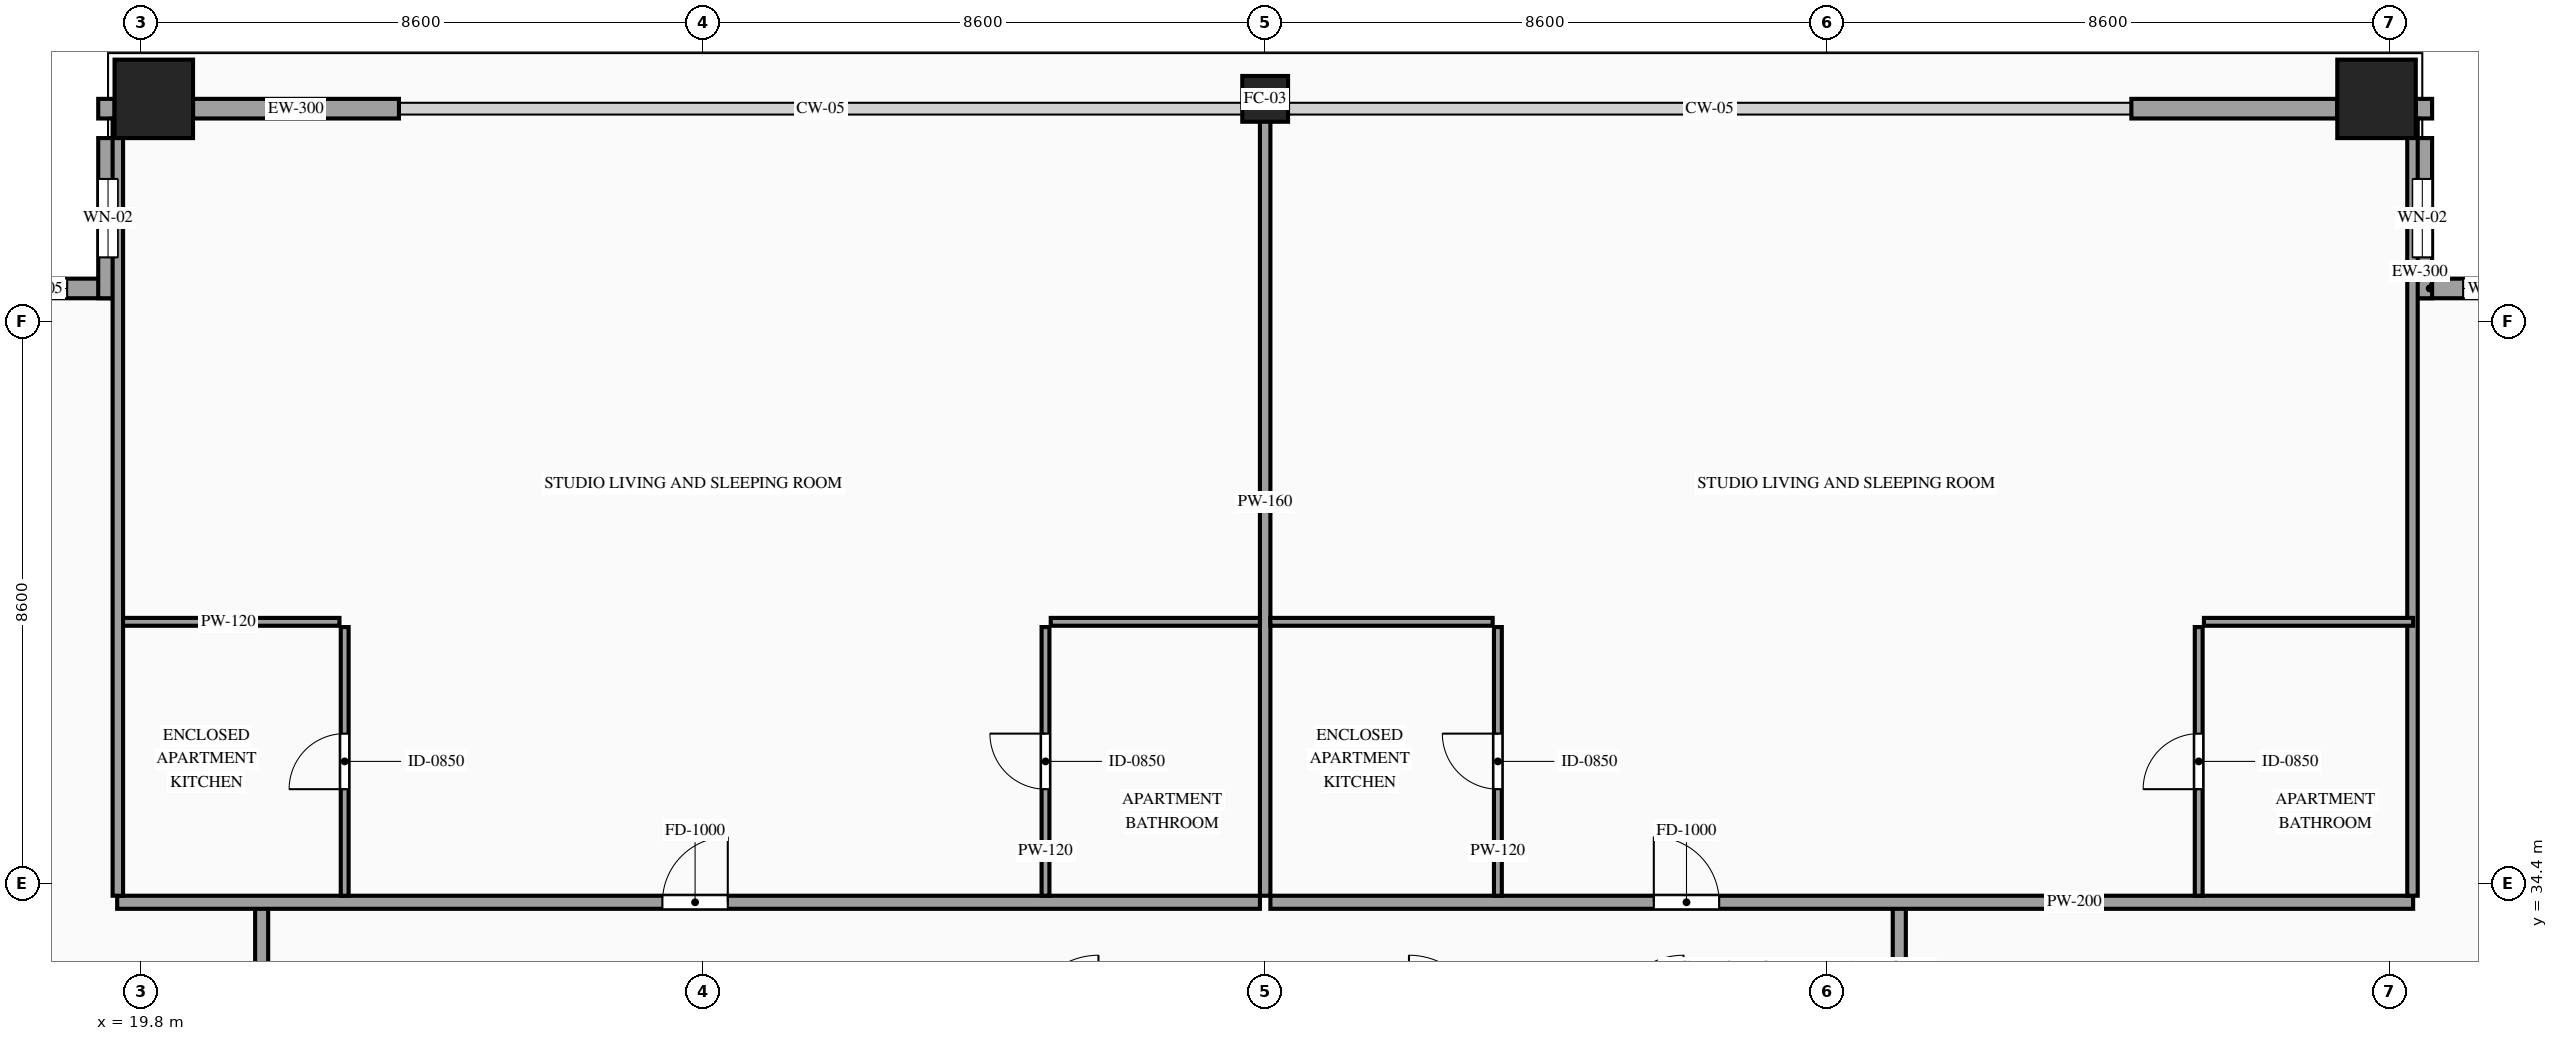
"""IFC4 building model, lengths in metres.
Left out: names, types, materials, properties, quantities, classifications, styles, units other than length and angle.
Written with IfcOpenShell. Run it as: python <this file> out.ifc"""

import sys

from ifc_helpers import new_model, si_unit, direction, frame, frame_2d, origin, origin_2d, place, context, subcontext, project, spatial, rectangle, hollow_rectangle, extrude, source, transform, mapped, element, fill, save


model = new_model("IFC4")
c1 = context("Model", 3, precision=1e-05, world=origin(), true_north=direction((0.0, 1.0)))
c2 = subcontext(c1, "Body", "Model", "MODEL_VIEW")
j1 = project(units=[si_unit("LENGTHUNIT", "METRE"), si_unit("PLANEANGLEUNIT", "RADIAN")], contexts=[c1])
p1 = place(None, origin())
s1 = spatial("IfcSite", under=j1, at=p1, CompositionType="ELEMENT")
p2 = place(p1, origin())
s2 = spatial("IfcBuilding", under=s1, at=p2, CompositionType="ELEMENT")
p3 = place(p2, frame((0.0, 0.0, 268.1)))
s3 = spatial("IfcBuildingStorey", under=s2, at=p3, CompositionType="ELEMENT", Elevation=268.1)
m1 = source(origin(), c2, "Body", "SweptSolid", [
    extrude(hollow_rectangle(XDim=1.2, YDim=1.2, WallThickness=0.055, at=origin_2d()), origin(), (0.0, 0.0, 1.0), 3.5),
])
p4 = place(p3, frame((20.0, 46.4, 0.0), z_axis=(0.0, 0.0, 1.0), x_axis=(1.0, 0.0, 0.0)))
e1 = element("IfcColumn", 1, at=p4, inside=s3, PredefinedType="COLUMN", context=c2, shape_type="MappedRepresentation", body=[
    mapped(m1, transform((0.0, 0.0, 0.0), scale=1.0)),
])
m2 = source(origin(), c2, "Body", "SweptSolid", [
    extrude(hollow_rectangle(XDim=0.7, YDim=0.7, WallThickness=0.032, at=origin_2d()), origin(), (0.0, 0.0, 1.0), 3.5),
])
p5 = place(p3, frame((37.0, 46.4, 0.0), z_axis=(0.0, 0.0, 1.0), x_axis=(1.0, 0.0, 0.0)))
e2 = element("IfcColumn", 2, at=p5, inside=s3, PredefinedType="COLUMN", context=c2, shape_type="MappedRepresentation", body=[
    mapped(m2, transform((0.0, 0.0, 0.0), scale=1.0)),
])
p6 = place(p3, frame((54.0, 46.4, 0.0), z_axis=(0.0, 0.0, 1.0), x_axis=(1.0, 0.0, 0.0)))
e3 = element("IfcColumn", 3, at=p6, inside=s3, PredefinedType="COLUMN", context=c2, shape_type="MappedRepresentation", body=[
    mapped(m1, transform((0.0, 0.0, 0.0), scale=1.0)),
])
p7 = place(p3, frame((19.45, 43.5, 0.0), z_axis=(0.0, 0.0, 1.0), x_axis=(-1.0, 0.0, 0.0)))
e4 = element("IfcWall", 4, at=p7, inside=s3, PredefinedType="SOLIDWALL", context=c2, shape_type="SweptSolid", body=[
    extrude(rectangle(XDim=2.45, YDim=0.3, at=frame_2d((1.225, 0.0))), origin(), (0.0, 0.0, 1.0), 3.28),
])
p8 = place(p7, frame((0.775, 0.0, 0.85)))
e5 = element("IfcOpeningElement", 5, at=p8, cuts=e4, PredefinedType="OPENING", context=c2, shape_type="SweptSolid", body=[
    extrude(rectangle(XDim=0.9, YDim=1.5, at=frame_2d((0.45, 0.75))), frame((0.0, 0.165, 0.0), z_axis=(0.0, -1.0, 0.0), x_axis=(1.0, 0.0, 0.0)), (0.0, 0.0, 1.0), 0.33),
])
p9 = place(p3, frame((19.3, 45.8, 0.0), z_axis=(0.0, 0.0, 1.0), x_axis=(0.0, -1.0, 0.0)))
e6 = element("IfcWall", 6, at=p9, inside=s3, PredefinedType="SOLIDWALL", context=c2, shape_type="SweptSolid", body=[
    extrude(rectangle(XDim=2.45, YDim=0.3, at=frame_2d((1.225, 0.0))), origin(), (0.0, 0.0, 1.0), 3.28),
])
p10 = place(p9, frame((0.625, 0.0, 0.85)))
e7 = element("IfcOpeningElement", 7, at=p10, cuts=e6, PredefinedType="OPENING", context=c2, shape_type="SweptSolid", body=[
    extrude(rectangle(XDim=1.2, YDim=2.1, at=frame_2d((0.6, 1.05))), frame((0.0, 0.165, 0.0), z_axis=(0.0, -1.0, 0.0), x_axis=(1.0, 0.0, 0.0)), (0.0, 0.0, 1.0), 0.33),
])
p11 = place(p3, frame((57.0, 43.5, 0.0), z_axis=(0.0, 0.0, 1.0), x_axis=(-1.0, 0.0, 0.0)))
e8 = element("IfcWall", 8, at=p11, inside=s3, PredefinedType="SOLIDWALL", context=c2, shape_type="SweptSolid", body=[
    extrude(rectangle(XDim=2.45, YDim=0.3, at=frame_2d((1.225, 0.0))), origin(), (0.0, 0.0, 1.0), 3.28),
])
p12 = place(p11, frame((0.775, 0.0, 0.85)))
e9 = element("IfcOpeningElement", 9, at=p12, cuts=e8, PredefinedType="OPENING", context=c2, shape_type="SweptSolid", body=[
    extrude(rectangle(XDim=0.9, YDim=1.5, at=frame_2d((0.45, 0.75))), frame((0.0, 0.165, 0.0), z_axis=(0.0, -1.0, 0.0), x_axis=(1.0, 0.0, 0.0)), (0.0, 0.0, 1.0), 0.33),
])
p13 = place(p3, frame((54.7, 43.35, 0.0), z_axis=(0.0, 0.0, 1.0), x_axis=(0.0, 1.0, 0.0)))
e10 = element("IfcWall", 10, at=p13, inside=s3, PredefinedType="SOLIDWALL", context=c2, shape_type="SweptSolid", body=[
    extrude(rectangle(XDim=2.45, YDim=0.3, at=frame_2d((1.225, 0.0))), origin(), (0.0, 0.0, 1.0), 3.28),
])
p14 = place(p13, frame((0.625, 0.0, 0.85)))
e11 = element("IfcOpeningElement", 11, at=p14, cuts=e10, PredefinedType="OPENING", context=c2, shape_type="SweptSolid", body=[
    extrude(rectangle(XDim=1.2, YDim=2.1, at=frame_2d((0.6, 1.05))), frame((0.0, 0.165, 0.0), z_axis=(0.0, -1.0, 0.0), x_axis=(1.0, 0.0, 0.0)), (0.0, 0.0, 1.0), 0.33),
])
m3 = source(origin(), c2, "Body", "SweptSolid", [
    extrude(rectangle(XDim=0.25, YDim=0.3, at=frame_2d((0.125, 0.0))), origin(), (0.0, 0.0, 1.0), 3.28),
])
for number, where, z_axis, x_axis in (
    (12, (19.15, 46.25, 0.0), (0.0, 0.0, 1.0), (1.0, 0.0, 0.0)),
    (13, (54.6, 46.25, 0.0), (0.0, 0.0, 1.0), (1.0, 0.0, 0.0)),
):
    element("IfcWall", number, at=place(p3, frame(where, z_axis=z_axis, x_axis=x_axis)), inside=s3, PredefinedType="SOLIDWALL", context=c2, shape_type="MappedRepresentation", body=[
        mapped(m3, transform((0.0, 0.0, 0.0), scale=1.0)),
    ])
m4 = source(origin(), c2, "Body", "SweptSolid", [
    extrude(rectangle(XDim=3.15, YDim=0.3, at=frame_2d((1.575, 0.0))), origin(), (0.0, 0.0, 1.0), 2.835),
])
for number, where, z_axis, x_axis in (
    (14, (20.6, 46.25, 0.0), (0.0, 0.0, 1.0), (1.0, 0.0, 0.0)),
    (15, (50.25, 46.25, 0.0), (0.0, 0.0, 1.0), (1.0, 0.0, 0.0)),
):
    element("IfcWall", number, at=place(p3, frame(where, z_axis=z_axis, x_axis=x_axis)), inside=s3, PredefinedType="SOLIDWALL", context=c2, shape_type="MappedRepresentation", body=[
        mapped(m4, transform((0.0, 0.0, 0.0), scale=1.0)),
    ])
m5 = source(origin(), c2, "Body", "SweptSolid", [
    extrude(rectangle(XDim=1.7, YDim=0.2, at=frame_2d((0.85, 0.0))), origin(), (0.0, 0.0, 1.0), 3.28),
])
for number, where, z_axis, x_axis in (
    (16, (21.65, 32.35, 0.0), (0.0, 0.0, 1.0), (0.0, 1.0, 0.0)),
    (17, (46.7, 32.35, 0.0), (0.0, 0.0, 1.0), (0.0, 1.0, 0.0)),
):
    element("IfcWall", number, at=place(p3, frame(where, z_axis=z_axis, x_axis=x_axis)), inside=s3, PredefinedType="PARTITIONING", context=c2, shape_type="MappedRepresentation", body=[
        mapped(m5, transform((0.0, 0.0, 0.0), scale=1.0)),
    ])
p15 = place(p3, frame((19.44, 34.11, 0.0), z_axis=(0.0, 0.0, 1.0), x_axis=(1.0, 0.0, 0.0)))
e18 = element("IfcWall", 18, at=p15, inside=s3, PredefinedType="PARTITIONING", context=c2, shape_type="SweptSolid", body=[
    extrude(rectangle(XDim=17.48, YDim=0.2, at=frame_2d((8.74, 0.0))), origin(), (0.0, 0.0, 1.0), 3.28),
])
p16 = place(p15, frame((8.34, 0.0, 0.0)))
e19 = element("IfcOpeningElement", 19, at=p16, cuts=e18, PredefinedType="OPENING", context=c2, shape_type="SweptSolid", body=[
    extrude(rectangle(XDim=1.0, YDim=2.2, at=frame_2d((0.5, 1.1))), frame((0.0, 0.115, 0.0), z_axis=(0.0, -1.0, 0.0), x_axis=(1.0, 0.0, 0.0)), (0.0, 0.0, 1.0), 0.23),
])
m6 = source(origin(), c2, "Body", "SweptSolid", [
    extrude(rectangle(XDim=12.04, YDim=0.16, at=frame_2d((6.02, 0.0))), origin(), (0.0, 0.0, 1.0), 2.787),
])
p17 = place(p3, frame((37.0, 34.21, 0.0), z_axis=(0.0, 0.0, 1.0), x_axis=(0.0, 1.0, 0.0)))
e20 = element("IfcWall", 20, at=p17, inside=s3, PredefinedType="PARTITIONING", context=c2, shape_type="MappedRepresentation", body=[
    mapped(m6, transform((0.0, 0.0, 0.0), scale=1.0)),
])
m7 = source(origin(), c2, "Body", "SweptSolid", [
    extrude(rectangle(XDim=3.4, YDim=0.12, at=frame_2d((1.7, 0.0))), origin(), (0.0, 0.0, 1.0), 3.28),
])
p18 = place(p3, frame((19.44, 38.4, 0.0), z_axis=(0.0, 0.0, 1.0), x_axis=(1.0, 0.0, 0.0)))
e21 = element("IfcWall", 21, at=p18, inside=s3, PredefinedType="PARTITIONING", context=c2, shape_type="MappedRepresentation", body=[
    mapped(m7, transform((0.0, 0.0, 0.0), scale=1.0)),
])
p19 = place(p3, frame((22.92, 34.21, 0.0), z_axis=(0.0, 0.0, 1.0), x_axis=(0.0, 1.0, 0.0)))
e22 = element("IfcWall", 22, at=p19, inside=s3, PredefinedType="PARTITIONING", context=c2, shape_type="SweptSolid", body=[
    extrude(rectangle(XDim=4.11, YDim=0.12, at=frame_2d((2.055, 0.0))), origin(), (0.0, 0.0, 1.0), 3.28),
])
p20 = place(p19, frame((1.63, 0.0, 0.0)))
e23 = element("IfcOpeningElement", 23, at=p20, cuts=e22, PredefinedType="OPENING", context=c2, shape_type="SweptSolid", body=[
    extrude(rectangle(XDim=0.85, YDim=2.1, at=frame_2d((0.425, 1.05))), frame((0.0, 0.075, 0.0), z_axis=(0.0, -1.0, 0.0), x_axis=(1.0, 0.0, 0.0)), (0.0, 0.0, 1.0), 0.15),
])
m8 = source(origin(), c2, "Body", "SweptSolid", [
    extrude(rectangle(XDim=3.2, YDim=0.12, at=frame_2d((1.6, 0.0))), origin(), (0.0, 0.0, 1.0), 3.28),
])
p21 = place(p3, frame((33.72, 38.4, 0.0), z_axis=(0.0, 0.0, 1.0), x_axis=(1.0, 0.0, 0.0)))
e24 = element("IfcWall", 24, at=p21, inside=s3, PredefinedType="PARTITIONING", context=c2, shape_type="MappedRepresentation", body=[
    mapped(m8, transform((0.0, 0.0, 0.0), scale=1.0)),
])
p22 = place(p3, frame((33.64, 34.21, 0.0), z_axis=(0.0, 0.0, 1.0), x_axis=(0.0, 1.0, 0.0)))
e25 = element("IfcWall", 25, at=p22, inside=s3, PredefinedType="PARTITIONING", context=c2, shape_type="SweptSolid", body=[
    extrude(rectangle(XDim=4.11, YDim=0.12, at=frame_2d((2.055, 0.0))), origin(), (0.0, 0.0, 1.0), 3.28),
])
p23 = place(p22, frame((1.63, 0.0, 0.0)))
e26 = element("IfcOpeningElement", 26, at=p23, cuts=e25, PredefinedType="OPENING", context=c2, shape_type="SweptSolid", body=[
    extrude(rectangle(XDim=0.85, YDim=2.1, at=frame_2d((0.425, 1.05))), frame((0.0, 0.075, 0.0), z_axis=(0.0, -1.0, 0.0), x_axis=(1.0, 0.0, 0.0)), (0.0, 0.0, 1.0), 0.15),
])
p24 = place(p3, frame((37.08, 34.11, 0.0), z_axis=(0.0, 0.0, 1.0), x_axis=(1.0, 0.0, 0.0)))
e27 = element("IfcWall", 27, at=p24, inside=s3, PredefinedType="PARTITIONING", context=c2, shape_type="SweptSolid", body=[
    extrude(rectangle(XDim=17.48, YDim=0.2, at=frame_2d((8.74, 0.0))), origin(), (0.0, 0.0, 1.0), 3.28),
])
p25 = place(p24, frame((5.865, 0.0, 0.0)))
e28 = element("IfcOpeningElement", 28, at=p25, cuts=e27, PredefinedType="OPENING", context=c2, shape_type="SweptSolid", body=[
    extrude(rectangle(XDim=1.0, YDim=2.2, at=frame_2d((0.5, 1.1))), frame((0.0, 0.115, 0.0), z_axis=(0.0, -1.0, 0.0), x_axis=(1.0, 0.0, 0.0)), (0.0, 0.0, 1.0), 0.23),
])
m9 = source(origin(), c2, "Body", "SweptSolid", [
    extrude(rectangle(XDim=11.89, YDim=0.16, at=frame_2d((5.945, 0.0))), origin(), (0.0, 0.0, 1.0), 3.28),
])
for number, where, z_axis, x_axis in (
    (29, (19.45, 34.21, 0.0), (0.0, 0.0, 1.0), (0.0, 1.0, 0.0)),
    (30, (54.55, 34.21, 0.0), (0.0, 0.0, 1.0), (0.0, 1.0, 0.0)),
):
    element("IfcWall", number, at=place(p3, frame(where, z_axis=z_axis, x_axis=x_axis)), inside=s3, PredefinedType="PARTITIONING", context=c2, shape_type="MappedRepresentation", body=[
        mapped(m9, transform((0.0, 0.0, 0.0), scale=1.0)),
    ])
m10 = source(origin(), c2, "Body", "SweptSolid", [
    extrude(rectangle(XDim=3.4, YDim=0.12, at=frame_2d((1.7, 0.0))), origin(), (0.0, 0.0, 1.0), 3.28),
])
p26 = place(p3, frame((37.08, 38.4, 0.0), z_axis=(0.0, 0.0, 1.0), x_axis=(1.0, 0.0, 0.0)))
e31 = element("IfcWall", 31, at=p26, inside=s3, PredefinedType="PARTITIONING", context=c2, shape_type="MappedRepresentation", body=[
    mapped(m10, transform((0.0, 0.0, 0.0), scale=1.0)),
])
p27 = place(p3, frame((40.56, 34.21, 0.0), z_axis=(0.0, 0.0, 1.0), x_axis=(0.0, 1.0, 0.0)))
e32 = element("IfcWall", 32, at=p27, inside=s3, PredefinedType="PARTITIONING", context=c2, shape_type="SweptSolid", body=[
    extrude(rectangle(XDim=4.11, YDim=0.12, at=frame_2d((2.055, 0.0))), origin(), (0.0, 0.0, 1.0), 3.28),
])
p28 = place(p27, frame((1.63, 0.0, 0.0)))
e33 = element("IfcOpeningElement", 33, at=p28, cuts=e32, PredefinedType="OPENING", context=c2, shape_type="SweptSolid", body=[
    extrude(rectangle(XDim=0.85, YDim=2.1, at=frame_2d((0.425, 1.05))), frame((0.0, 0.075, 0.0), z_axis=(0.0, -1.0, 0.0), x_axis=(1.0, 0.0, 0.0)), (0.0, 0.0, 1.0), 0.15),
])
p29 = place(p3, frame((51.36, 38.4, 0.0), z_axis=(0.0, 0.0, 1.0), x_axis=(1.0, 0.0, 0.0)))
e34 = element("IfcWall", 34, at=p29, inside=s3, PredefinedType="PARTITIONING", context=c2, shape_type="MappedRepresentation", body=[
    mapped(m8, transform((0.0, 0.0, 0.0), scale=1.0)),
])
p30 = place(p3, frame((51.28, 34.21, 0.0), z_axis=(0.0, 0.0, 1.0), x_axis=(0.0, 1.0, 0.0)))
e35 = element("IfcWall", 35, at=p30, inside=s3, PredefinedType="PARTITIONING", context=c2, shape_type="SweptSolid", body=[
    extrude(rectangle(XDim=4.11, YDim=0.12, at=frame_2d((2.055, 0.0))), origin(), (0.0, 0.0, 1.0), 3.28),
])
p31 = place(p30, frame((1.63, 0.0, 0.0)))
e36 = element("IfcOpeningElement", 36, at=p31, cuts=e35, PredefinedType="OPENING", context=c2, shape_type="SweptSolid", body=[
    extrude(rectangle(XDim=0.85, YDim=2.1, at=frame_2d((0.425, 1.05))), frame((0.0, 0.075, 0.0), z_axis=(0.0, -1.0, 0.0), x_axis=(1.0, 0.0, 0.0)), (0.0, 0.0, 1.0), 0.15),
])
m11 = source(origin(), c2, "Body", "SweptSolid", [
    extrude(rectangle(XDim=0.9, YDim=1.5, at=frame_2d((0.45, 0.75))), frame((0.0, 0.03, 0.0), z_axis=(0.0, -1.0, 0.0), x_axis=(1.0, 0.0, 0.0)), (0.0, 0.0, 1.0), 0.06),
])
p32 = place(p8, origin())
e37 = element("IfcWindow", 37, at=p32, inside=s3, PartitioningType="SINGLE_PANEL", PredefinedType="WINDOW", context=c2, shape_type="MappedRepresentation", body=[
    mapped(m11, transform((0.0, 0.0, 0.0), scale=1.0)),
])
fill(e5, e37)
m12 = source(origin(), c2, "Body", "SweptSolid", [
    extrude(rectangle(XDim=1.2, YDim=2.1, at=frame_2d((0.6, 1.05))), frame((0.0, 0.03, 0.0), z_axis=(0.0, -1.0, 0.0), x_axis=(1.0, 0.0, 0.0)), (0.0, 0.0, 1.0), 0.06),
])
p33 = place(p10, origin())
e38 = element("IfcWindow", 38, at=p33, inside=s3, PartitioningType="SINGLE_PANEL", PredefinedType="WINDOW", context=c2, shape_type="MappedRepresentation", body=[
    mapped(m12, transform((0.0, 0.0, 0.0), scale=1.0)),
])
fill(e7, e38)
p34 = place(p12, origin())
e39 = element("IfcWindow", 39, at=p34, inside=s3, PartitioningType="SINGLE_PANEL", PredefinedType="WINDOW", context=c2, shape_type="MappedRepresentation", body=[
    mapped(m11, transform((0.0, 0.0, 0.0), scale=1.0)),
])
fill(e9, e39)
p35 = place(p14, origin())
e40 = element("IfcWindow", 40, at=p35, inside=s3, PartitioningType="SINGLE_PANEL", PredefinedType="WINDOW", context=c2, shape_type="MappedRepresentation", body=[
    mapped(m12, transform((0.0, 0.0, 0.0), scale=1.0)),
])
fill(e11, e40)
m13 = source(origin(), c2, "Body", "SweptSolid", [
    extrude(rectangle(XDim=1.0, YDim=2.2, at=frame_2d((0.5, 1.1))), frame((0.0, 0.025, 0.0), z_axis=(0.0, -1.0, 0.0), x_axis=(1.0, 0.0, 0.0)), (0.0, 0.0, 1.0), 0.05),
])
p36 = place(p16, origin())
e41 = element("IfcDoor", 41, at=p36, inside=s3, OperationType="SINGLE_SWING_RIGHT", PredefinedType="DOOR", context=c2, shape_type="MappedRepresentation", body=[
    mapped(m13, transform((0.0, 0.0, 0.0), scale=1.0)),
])
fill(e19, e41)
m14 = source(origin(), c2, "Body", "SweptSolid", [
    extrude(rectangle(XDim=0.85, YDim=2.1, at=frame_2d((0.425, 1.05))), frame((0.0, 0.025, 0.0), z_axis=(0.0, -1.0, 0.0), x_axis=(1.0, 0.0, 0.0)), (0.0, 0.0, 1.0), 0.05),
])
p37 = place(p20, origin())
e42 = element("IfcDoor", 42, at=p37, inside=s3, OperationType="SINGLE_SWING_LEFT", PredefinedType="DOOR", context=c2, shape_type="MappedRepresentation", body=[
    mapped(m14, transform((0.0, 0.0, 0.0), scale=1.0)),
])
fill(e23, e42)
p38 = place(p23, origin())
e43 = element("IfcDoor", 43, at=p38, inside=s3, OperationType="SINGLE_SWING_RIGHT", PredefinedType="DOOR", context=c2, shape_type="MappedRepresentation", body=[
    mapped(m14, transform((0.0, 0.0, 0.0), scale=1.0)),
])
fill(e26, e43)
p39 = place(p25, origin())
e44 = element("IfcDoor", 44, at=p39, inside=s3, OperationType="SINGLE_SWING_LEFT", PredefinedType="DOOR", context=c2, shape_type="MappedRepresentation", body=[
    mapped(m13, transform((0.0, 0.0, 0.0), scale=1.0)),
])
fill(e28, e44)
p40 = place(p28, origin())
e45 = element("IfcDoor", 45, at=p40, inside=s3, OperationType="SINGLE_SWING_RIGHT", PredefinedType="DOOR", context=c2, shape_type="MappedRepresentation", body=[
    mapped(m14, transform((0.0, 0.0, 0.0), scale=1.0)),
])
fill(e33, e45)
p41 = place(p31, origin())
e46 = element("IfcDoor", 46, at=p41, inside=s3, OperationType="SINGLE_SWING_LEFT", PredefinedType="DOOR", context=c2, shape_type="MappedRepresentation", body=[
    mapped(m14, transform((0.0, 0.0, 0.0), scale=1.0)),
])
fill(e36, e46)
save(model, sys.argv[1])
